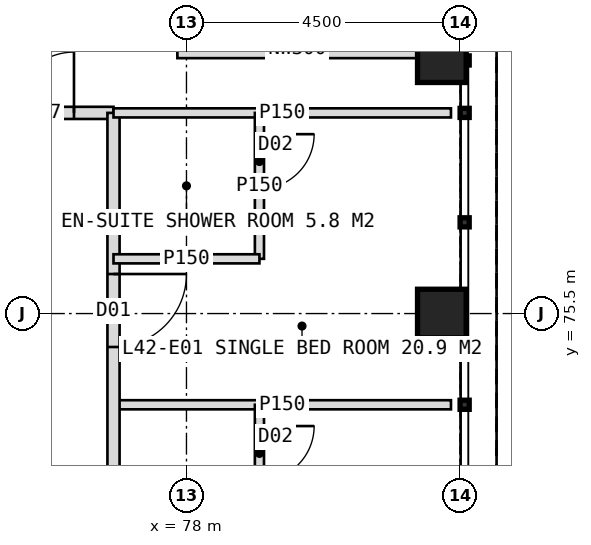
"""IFC4 building model, lengths in metres.
Left out: names, types, materials, properties, quantities, classifications, styles, units other than length and angle.
Written with IfcOpenShell. Run it as: python <this file> out.ifc"""

import sys

from ifc_helpers import new_model, si_unit, direction, frame, frame_2d, origin, origin_2d, place, context, subcontext, project, spatial, rectangle, hollow_rectangle, extrude, element, fill, save


model = new_model("IFC4")
c1 = context("Model", 3, precision=1e-05, world=origin(), true_north=direction((0.0, 1.0)))
c2 = subcontext(c1, "Body", "Model", "MODEL_VIEW")
j1 = project(units=[si_unit("LENGTHUNIT", "METRE"), si_unit("PLANEANGLEUNIT", "RADIAN")], contexts=[c1])
p1 = place(None, origin())
s1 = spatial("IfcSite", under=j1, at=p1, CompositionType="ELEMENT")
p2 = place(p1, origin())
s2 = spatial("IfcBuilding", under=s1, at=p2, CompositionType="ELEMENT")
p3 = place(p2, frame((0.0, 0.0, 177.0)))
s3 = spatial("IfcBuildingStorey", under=s2, at=p3, CompositionType="ELEMENT", Elevation=177.0)
for number, where, z_axis, x_axis in (
    (1, (82.2, 75.5, 0.0), (0.0, 0.0, 1.0), (1.0, 0.0, 0.0)),
    (2, (82.2, 79.7, 0.0), (0.0, 0.0, 1.0), (1.0, 0.0, 0.0)),
):
    element("IfcColumn", number, at=place(p3, frame(where, z_axis=z_axis, x_axis=x_axis)), inside=s3, PredefinedType="COLUMN", context=c2, shape_type="SweptSolid", body=[
        extrude(hollow_rectangle(XDim=0.8, YDim=0.8, WallThickness=0.08, at=origin_2d()), origin(), (0.0, 0.0, 1.0), 4.0),
    ])
p4 = place(p3, frame((77.85, 79.85, 0.0), z_axis=(0.0, 0.0, 1.0), x_axis=(1.0, 0.0, 0.0)))
e3 = element("IfcWall", 3, at=p4, inside=s3, PredefinedType="ELEMENTEDWALL", context=c2, shape_type="SweptSolid", body=[
    extrude(rectangle(XDim=3.95, YDim=0.3, at=frame_2d((1.975, 0.0))), origin(), (0.0, 0.0, 1.0), 2.85),
])
p5 = place(p3, frame((43.2, 78.8, 0.0), z_axis=(0.0, 0.0, 1.0), x_axis=(1.0, 0.0, 0.0)))
e4 = element("IfcWall", 4, at=p5, inside=s3, PredefinedType="PARTITIONING", context=c2, shape_type="SweptSolid", body=[
    extrude(rectangle(XDim=33.6, YDim=0.2, at=frame_2d((16.8, 0.0))), origin(), (0.0, 0.0, 1.0), 3.75),
])
p6 = place(p5, frame((2.65, 0.0, 0.0)))
e5 = element("IfcOpeningElement", 5, at=p6, cuts=e4, PredefinedType="OPENING", context=c2, shape_type="SweptSolid", body=[
    extrude(rectangle(XDim=1.2, YDim=2.2, at=frame_2d((0.6, 1.1))), frame((0.0, 0.11, 0.0), z_axis=(0.0, -1.0, 0.0), x_axis=(1.0, 0.0, 0.0)), (0.0, 0.0, 1.0), 0.22),
])
p7 = place(p5, frame((14.05, 0.0, 0.0)))
e6 = element("IfcOpeningElement", 6, at=p7, cuts=e4, PredefinedType="OPENING", context=c2, shape_type="SweptSolid", body=[
    extrude(rectangle(XDim=1.2, YDim=2.2, at=frame_2d((0.6, 1.1))), frame((0.0, 0.11, 0.0), z_axis=(0.0, -1.0, 0.0), x_axis=(1.0, 0.0, 0.0)), (0.0, 0.0, 1.0), 0.22),
])
p8 = place(p5, frame((22.45, 0.0, 0.0)))
e7 = element("IfcOpeningElement", 7, at=p8, cuts=e4, PredefinedType="OPENING", context=c2, shape_type="SweptSolid", body=[
    extrude(rectangle(XDim=1.2, YDim=2.2, at=frame_2d((0.6, 1.1))), frame((0.0, 0.11, 0.0), z_axis=(0.0, -1.0, 0.0), x_axis=(1.0, 0.0, 0.0)), (0.0, 0.0, 1.0), 0.22),
])
p9 = place(p5, frame((28.05, 0.0, 0.0)))
e8 = element("IfcOpeningElement", 8, at=p9, cuts=e4, PredefinedType="OPENING", context=c2, shape_type="SweptSolid", body=[
    extrude(rectangle(XDim=1.0, YDim=2.1, at=frame_2d((0.5, 1.05))), frame((0.0, 0.11, 0.0), z_axis=(0.0, -1.0, 0.0), x_axis=(1.0, 0.0, 0.0)), (0.0, 0.0, 1.0), 0.22),
])
p10 = place(p5, frame((31.95, 0.0, 0.0)))
e9 = element("IfcOpeningElement", 9, at=p10, cuts=e4, PredefinedType="OPENING", context=c2, shape_type="SweptSolid", body=[
    extrude(rectangle(XDim=1.0, YDim=2.1, at=frame_2d((0.5, 1.05))), frame((0.0, 0.11, 0.0), z_axis=(0.0, -1.0, 0.0), x_axis=(1.0, 0.0, 0.0)), (0.0, 0.0, 1.0), 0.22),
])
p11 = place(p3, frame((76.8, 74.0, 0.0), z_axis=(0.0, 0.0, 1.0), x_axis=(1.0, 0.0, 0.0)))
e10 = element("IfcWall", 10, at=p11, inside=s3, PredefinedType="PARTITIONING", context=c2, shape_type="SweptSolid", body=[
    extrude(rectangle(XDim=5.55, YDim=0.15, at=frame_2d((2.775, 0.0))), origin(), (0.0, 0.0, 1.0), 3.75),
])
p12 = place(p3, frame((76.8, 78.8, 0.0), z_axis=(0.0, 0.0, 1.0), x_axis=(0.0, -1.0, 0.0)))
e11 = element("IfcWall", 11, at=p12, inside=s3, PredefinedType="PARTITIONING", context=c2, shape_type="SweptSolid", body=[
    extrude(rectangle(XDim=33.6, YDim=0.2, at=frame_2d((16.8, 0.0))), origin(), (0.0, 0.0, 1.0), 3.75),
])
p13 = place(p12, frame((2.65, 0.0, 0.0)))
e12 = element("IfcOpeningElement", 12, at=p13, cuts=e11, PredefinedType="OPENING", context=c2, shape_type="SweptSolid", body=[
    extrude(rectangle(XDim=1.2, YDim=2.2, at=frame_2d((0.6, 1.1))), frame((0.0, 0.11, 0.0), z_axis=(0.0, -1.0, 0.0), x_axis=(1.0, 0.0, 0.0)), (0.0, 0.0, 1.0), 0.22),
])
p14 = place(p12, frame((7.45, 0.0, 0.0)))
e13 = element("IfcOpeningElement", 13, at=p14, cuts=e11, PredefinedType="OPENING", context=c2, shape_type="SweptSolid", body=[
    extrude(rectangle(XDim=1.2, YDim=2.2, at=frame_2d((0.6, 1.1))), frame((0.0, 0.11, 0.0), z_axis=(0.0, -1.0, 0.0), x_axis=(1.0, 0.0, 0.0)), (0.0, 0.0, 1.0), 0.22),
])
p15 = place(p12, frame((13.45, 0.0, 0.0)))
e14 = element("IfcOpeningElement", 14, at=p15, cuts=e11, PredefinedType="OPENING", context=c2, shape_type="SweptSolid", body=[
    extrude(rectangle(XDim=1.2, YDim=2.2, at=frame_2d((0.6, 1.1))), frame((0.0, 0.11, 0.0), z_axis=(0.0, -1.0, 0.0), x_axis=(1.0, 0.0, 0.0)), (0.0, 0.0, 1.0), 0.22),
])
p16 = place(p12, frame((19.45, 0.0, 0.0)))
e15 = element("IfcOpeningElement", 15, at=p16, cuts=e11, PredefinedType="OPENING", context=c2, shape_type="SweptSolid", body=[
    extrude(rectangle(XDim=1.2, YDim=2.2, at=frame_2d((0.6, 1.1))), frame((0.0, 0.11, 0.0), z_axis=(0.0, -1.0, 0.0), x_axis=(1.0, 0.0, 0.0)), (0.0, 0.0, 1.0), 0.22),
])
p17 = place(p12, frame((25.45, 0.0, 0.0)))
e16 = element("IfcOpeningElement", 16, at=p17, cuts=e11, PredefinedType="OPENING", context=c2, shape_type="SweptSolid", body=[
    extrude(rectangle(XDim=1.2, YDim=2.2, at=frame_2d((0.6, 1.1))), frame((0.0, 0.11, 0.0), z_axis=(0.0, -1.0, 0.0), x_axis=(1.0, 0.0, 0.0)), (0.0, 0.0, 1.0), 0.22),
])
p18 = place(p3, frame((76.8, 78.8, 0.0), z_axis=(0.0, 0.0, 1.0), x_axis=(1.0, 0.0, 0.0)))
e17 = element("IfcWall", 17, at=p18, inside=s3, PredefinedType="PARTITIONING", context=c2, shape_type="SweptSolid", body=[
    extrude(rectangle(XDim=5.55, YDim=0.15, at=frame_2d((2.775, 0.0))), origin(), (0.0, 0.0, 1.0), 3.75),
])
p19 = place(p3, frame((79.2, 78.8, 0.0), z_axis=(0.0, 0.0, 1.0), x_axis=(0.0, -1.0, 0.0)))
e18 = element("IfcWall", 18, at=p19, inside=s3, PredefinedType="PARTITIONING", context=c2, shape_type="SweptSolid", body=[
    extrude(rectangle(XDim=2.4, YDim=0.15, at=frame_2d((1.2, 0.0))), origin(), (0.0, 0.0, 1.0), 3.75),
])
p20 = place(p19, frame((0.35, 0.0, 0.0)))
e19 = element("IfcOpeningElement", 19, at=p20, cuts=e18, PredefinedType="OPENING", context=c2, shape_type="SweptSolid", body=[
    extrude(rectangle(XDim=0.9, YDim=2.1, at=frame_2d((0.45, 1.05))), frame((0.0, 0.085, 0.0), z_axis=(0.0, -1.0, 0.0), x_axis=(1.0, 0.0, 0.0)), (0.0, 0.0, 1.0), 0.17),
])
p21 = place(p3, frame((76.8, 76.4, 0.0), z_axis=(0.0, 0.0, 1.0), x_axis=(1.0, 0.0, 0.0)))
e20 = element("IfcWall", 20, at=p21, inside=s3, PredefinedType="PARTITIONING", context=c2, shape_type="SweptSolid", body=[
    extrude(rectangle(XDim=2.4, YDim=0.15, at=frame_2d((1.2, 0.0))), origin(), (0.0, 0.0, 1.0), 3.75),
])
p22 = place(p3, frame((79.2, 74.0, 0.0), z_axis=(0.0, 0.0, 1.0), x_axis=(0.0, -1.0, 0.0)))
e21 = element("IfcWall", 21, at=p22, inside=s3, PredefinedType="PARTITIONING", context=c2, shape_type="SweptSolid", body=[
    extrude(rectangle(XDim=2.4, YDim=0.15, at=frame_2d((1.2, 0.0))), origin(), (0.0, 0.0, 1.0), 3.75),
])
p23 = place(p22, frame((0.35, 0.0, 0.0)))
e22 = element("IfcOpeningElement", 22, at=p23, cuts=e21, PredefinedType="OPENING", context=c2, shape_type="SweptSolid", body=[
    extrude(rectangle(XDim=0.9, YDim=2.1, at=frame_2d((0.45, 1.05))), frame((0.0, 0.085, 0.0), z_axis=(0.0, -1.0, 0.0), x_axis=(1.0, 0.0, 0.0)), (0.0, 0.0, 1.0), 0.17),
])
p24 = place(p10, origin())
e23 = element("IfcDoor", 23, at=p24, inside=s3, OperationType="SINGLE_SWING_RIGHT", PredefinedType="DOOR", context=c2, shape_type="SweptSolid", body=[
    extrude(rectangle(XDim=1.0, YDim=2.1, at=frame_2d((0.5, 1.05))), frame((0.0, 0.025, 0.0), z_axis=(0.0, -1.0, 0.0), x_axis=(1.0, 0.0, 0.0)), (0.0, 0.0, 1.0), 0.05),
])
fill(e9, e23)
p25 = place(p13, origin())
e24 = element("IfcDoor", 24, at=p25, inside=s3, OperationType="SINGLE_SWING_LEFT", PredefinedType="DOOR", context=c2, shape_type="SweptSolid", body=[
    extrude(rectangle(XDim=1.2, YDim=2.2, at=frame_2d((0.6, 1.1))), frame((0.0, 0.025, 0.0), z_axis=(0.0, -1.0, 0.0), x_axis=(1.0, 0.0, 0.0)), (0.0, 0.0, 1.0), 0.05),
])
fill(e12, e24)
p26 = place(p20, origin())
e25 = element("IfcDoor", 25, at=p26, inside=s3, OperationType="SINGLE_SWING_LEFT", PredefinedType="DOOR", context=c2, shape_type="SweptSolid", body=[
    extrude(rectangle(XDim=0.9, YDim=2.1, at=frame_2d((0.45, 1.05))), frame((0.0, 0.025, 0.0), z_axis=(0.0, -1.0, 0.0), x_axis=(1.0, 0.0, 0.0)), (0.0, 0.0, 1.0), 0.05),
])
fill(e19, e25)
p27 = place(p23, origin())
e26 = element("IfcDoor", 26, at=p27, inside=s3, OperationType="SINGLE_SWING_LEFT", PredefinedType="DOOR", context=c2, shape_type="SweptSolid", body=[
    extrude(rectangle(XDim=0.9, YDim=2.1, at=frame_2d((0.45, 1.05))), frame((0.0, 0.025, 0.0), z_axis=(0.0, -1.0, 0.0), x_axis=(1.0, 0.0, 0.0)), (0.0, 0.0, 1.0), 0.05),
])
fill(e22, e26)
save(model, sys.argv[1])
